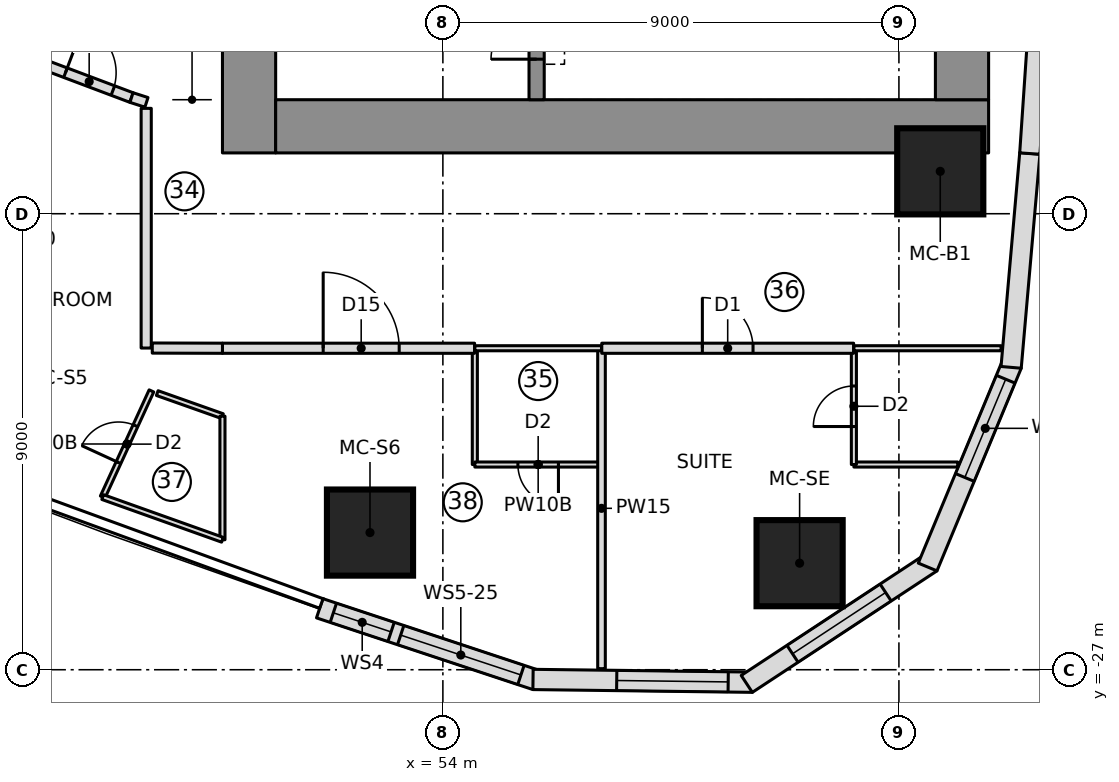
"""IFC4 building model, lengths in metres.
Left out: names, types, materials, properties, quantities, classifications, styles, units other than length and angle.
Written with IfcOpenShell. Run it as: python <this file> out.ifc"""

import sys

from ifc_helpers import new_model, si_unit, direction, frame, frame_2d, origin, origin_2d, place, context, subcontext, project, spatial, polyline, rectangle, outline, extrude, element, fill, save


model = new_model("IFC4")
c1 = context("Model", 3, precision=1e-05, world=origin(), true_north=direction((0.0, 1.0)))
c2 = subcontext(c1, "Body", "Model", "MODEL_VIEW")
j1 = project(units=[si_unit("LENGTHUNIT", "METRE"), si_unit("PLANEANGLEUNIT", "RADIAN")], contexts=[c1])
p1 = place(None, origin())
s1 = spatial("IfcSite", under=j1, at=p1, CompositionType="ELEMENT")
p2 = place(p1, origin())
s2 = spatial("IfcBuilding", under=s1, at=p2, CompositionType="ELEMENT")
p3 = place(p2, frame((0.0, 0.0, 116.85)))
s3 = spatial("IfcBuildingStorey", under=s2, at=p3, CompositionType="ELEMENT", Elevation=116.85)
p4 = place(p3, frame((50.175, -16.8, 0.0), z_axis=(0.0, 0.0, 1.0), x_axis=(0.0, 1.0, 0.0)))
e1 = element("IfcWall", 1, at=p4, inside=s3, PredefinedType="SHEAR", context=c2, shape_type="SweptSolid", body=[
    extrude(rectangle(XDim=10.15, YDim=1.05, at=frame_2d((5.075, 0.0))), origin(), (0.0, 0.0, 1.0), 3.55),
])
p5 = place(p4, frame((2.55, 0.0, 0.0)))
e2 = element("IfcOpeningElement", 2, at=p5, cuts=e1, PredefinedType="OPENING", context=c2, shape_type="SweptSolid", body=[
    extrude(rectangle(XDim=1.1, YDim=2.1, at=frame_2d((0.55, 1.05))), frame((0.0, 0.535, 0.0), z_axis=(0.0, -1.0, 0.0), x_axis=(1.0, 0.0, 0.0)), (0.0, 0.0, 1.0), 1.07),
])
p6 = place(p3, frame((50.7, -16.275, 0.0), z_axis=(0.0, 0.0, 1.0), x_axis=(1.0, 0.0, 0.0)))
e3 = element("IfcWall", 3, at=p6, inside=s3, PredefinedType="SHEAR", context=c2, shape_type="SweptSolid", body=[
    extrude(rectangle(XDim=14.07, YDim=1.05, at=frame_2d((7.035, 0.0))), origin(), (0.0, 0.0, 1.0), 3.55),
])
p7 = place(p3, frame((64.245, -15.75, 0.0), z_axis=(0.0, 0.0, 1.0), x_axis=(0.0, 1.0, 0.0)))
e4 = element("IfcWall", 4, at=p7, inside=s3, PredefinedType="SHEAR", context=c2, shape_type="SweptSolid", body=[
    extrude(rectangle(XDim=6.361, YDim=1.05, at=frame_2d((3.181, 0.0))), origin(), (0.0, 0.0, 1.0), 3.55),
])
p8 = place(p3, frame((55.85, -15.75, 0.0), z_axis=(0.0, 0.0, 1.0), x_axis=(0.0, 1.0, 0.0)))
e5 = element("IfcWall", 5, at=p8, inside=s3, PredefinedType="SHEAR", context=c2, shape_type="SweptSolid", body=[
    extrude(rectangle(XDim=5.4, YDim=0.3, at=frame_2d((2.7, 0.0))), origin(), (0.0, 0.0, 1.0), 3.55),
])
p9 = place(p8, frame((3.6, 0.0, 0.0)))
e6 = element("IfcOpeningElement", 6, at=p9, cuts=e5, PredefinedType="OPENING", context=c2, shape_type="SweptSolid", body=[
    extrude(rectangle(XDim=1.1, YDim=2.1, at=frame_2d((0.55, 1.05))), frame((0.0, 0.16, 0.0), z_axis=(0.0, -1.0, 0.0), x_axis=(1.0, 0.0, 0.0)), (0.0, 0.0, 1.0), 0.32),
])
p10 = place(p8, frame((0.8, 0.0, 0.0)))
e7 = element("IfcOpeningElement", 7, at=p10, cuts=e5, PredefinedType="OPENING", context=c2, shape_type="SweptSolid", body=[
    extrude(rectangle(XDim=0.9, YDim=2.1, at=frame_2d((0.45, 1.05))), frame((0.0, 0.16, 0.0), z_axis=(0.0, -1.0, 0.0), x_axis=(1.0, 0.0, 0.0)), (0.0, 0.0, 1.0), 0.32),
])
for number, where, z_axis, x_axis in (
    (8, (52.562, -24.293, 0.0), (0.0, 0.0, 1.0), (1.0, 0.0, 0.0)),
    (9, (61.04, -24.897, 0.0), (0.0, 0.0, 1.0), (1.0, 0.0, 0.0)),
    (10, (63.816, -17.164, 0.0), (0.0, 0.0, 1.0), (1.0, 0.0, 0.0)),
):
    element("IfcColumn", number, at=place(p3, frame(where, z_axis=z_axis, x_axis=x_axis)), inside=s3, PredefinedType="COLUMN", context=c2, shape_type="SweptSolid", body=[
        extrude(rectangle(XDim=1.7, YDim=1.7, at=origin_2d()), origin(), (0.0, 0.0, 1.0), 3.55),
    ])
p11 = place(p3, frame((51.569, -25.787, 0.0), z_axis=(0.0, 0.0, 1.0), x_axis=(0.94925004851, -0.314522408429, 0.0)))
e11 = element("IfcWall", 11, at=p11, inside=s3, PredefinedType="NOTDEFINED", context=c2, shape_type="SweptSolid", body=[
    extrude(outline(polyline([(0.0, -0.2), (4.499, -0.2), (4.437, 0.2), (0.0, 0.2), (0.0, -0.2)])), origin(), (0.0, 0.0, 1.0), 3.25),
])
p12 = place(p11, frame((0.284, 0.0, 0.9)))
e12 = element("IfcOpeningElement", 12, at=p12, cuts=e11, PredefinedType="OPENING", context=c2, shape_type="SweptSolid", body=[
    extrude(rectangle(XDim=1.2, YDim=1.8, at=frame_2d((0.6, 0.9))), frame((0.0, 0.21, 0.0), z_axis=(0.0, -1.0, 0.0), x_axis=(1.0, 0.0, 0.0)), (0.0, 0.0, 1.0), 0.42),
])
p13 = place(p11, frame((1.684, 0.0, 0.9)))
e13 = element("IfcOpeningElement", 13, at=p13, cuts=e11, PredefinedType="OPENING", context=c2, shape_type="SweptSolid", body=[
    extrude(rectangle(XDim=2.5, YDim=1.8, at=frame_2d((1.25, 0.9))), frame((0.0, 0.21, 0.0), z_axis=(0.0, -1.0, 0.0), x_axis=(1.0, 0.0, 0.0)), (0.0, 0.0, 1.0), 0.42),
])
p14 = place(p3, frame((55.81, -27.192, 0.0), z_axis=(0.0, 0.0, 1.0), x_axis=(0.999919718849, -0.012671063772, 0.0)))
e14 = element("IfcWall", 14, at=p14, inside=s3, PredefinedType="NOTDEFINED", context=c2, shape_type="SweptSolid", body=[
    extrude(outline(polyline([(-0.031, -0.2), (4.3, -0.2), (4.177, 0.2), (0.031, 0.2), (-0.031, -0.2)])), origin(), (0.0, 0.0, 1.0), 3.25),
])
p15 = place(p14, frame((1.621, 0.0, 0.6)))
e15 = element("IfcOpeningElement", 15, at=p15, cuts=e14, PredefinedType="OPENING", context=c2, shape_type="SweptSolid", body=[
    extrude(outline(polyline([(0.0, 1.35), (0.084, 1.771), (0.322, 2.128), (0.679, 2.366), (1.1, 2.45), (1.521, 2.366), (1.878, 2.128), (2.116, 1.771), (2.2, 1.35), (2.2, 1.1), (2.116, 0.679), (1.878, 0.322), (1.521, 0.084), (1.1, 0.0), (0.679, 0.084), (0.322, 0.322), (0.084, 0.679), (0.0, 1.1), (0.0, 1.35)])), frame((0.0, 0.21, 0.0), z_axis=(0.0, -1.0, 0.0), x_axis=(1.0, 0.0, 0.0)), (0.0, 0.0, 1.0), 0.42),
])
p16 = place(p3, frame((60.049, -27.246, 0.0), z_axis=(0.0, 0.0, 1.0), x_axis=(0.835340523653, 0.549732852887, 0.0)))
e16 = element("IfcWall", 16, at=p16, inside=s3, PredefinedType="NOTDEFINED", context=c2, shape_type="SweptSolid", body=[
    extrude(outline(polyline([(-0.061, -0.2), (4.3, -0.2), (4.178, 0.2), (0.061, 0.2), (-0.061, -0.2)])), origin(), (0.0, 0.0, 1.0), 3.25),
])
p17 = place(p16, frame((1.02, 0.0, 0.6)))
e17 = element("IfcOpeningElement", 17, at=p17, cuts=e16, PredefinedType="OPENING", context=c2, shape_type="SweptSolid", body=[
    extrude(outline(polyline([(0.0, 1.35), (0.084, 1.771), (0.322, 2.128), (0.679, 2.366), (1.1, 2.45), (1.521, 2.366), (1.878, 2.128), (2.116, 1.771), (2.2, 1.35), (2.2, 1.1), (2.116, 0.679), (1.878, 0.322), (1.521, 0.084), (1.1, 0.0), (0.679, 0.084), (0.322, 0.322), (0.084, 0.679), (0.0, 1.1), (0.0, 1.35)])), frame((0.0, 0.21, 0.0), z_axis=(0.0, -1.0, 0.0), x_axis=(1.0, 0.0, 0.0)), (0.0, 0.0, 1.0), 0.42),
])
p18 = place(p3, frame((63.59, -24.916, 0.0), z_axis=(0.0, 0.0, 1.0), x_axis=(0.383997751971, 0.923334027577, 0.0)))
e18 = element("IfcWall", 18, at=p18, inside=s3, PredefinedType="NOTDEFINED", context=c2, shape_type="SweptSolid", body=[
    extrude(outline(polyline([(-0.061, -0.2), (4.27, -0.2), (4.208, 0.2), (0.061, 0.2), (-0.061, -0.2)])), origin(), (0.0, 0.0, 1.0), 3.25),
])
p19 = place(p18, frame((1.852, 0.0, 0.6)))
e19 = element("IfcOpeningElement", 19, at=p19, cuts=e18, PredefinedType="OPENING", context=c2, shape_type="SweptSolid", body=[
    extrude(outline(polyline([(0.0, 1.4), (0.08, 1.802), (0.308, 2.142), (0.648, 2.37), (1.05, 2.45), (1.452, 2.37), (1.792, 2.142), (2.02, 1.802), (2.1, 1.4), (2.1, 1.05), (2.02, 0.648), (1.792, 0.308), (1.452, 0.08), (1.05, 0.0), (0.648, 0.08), (0.308, 0.308), (0.08, 0.648), (0.0, 1.05), (0.0, 1.4)])), frame((0.0, 0.21, 0.0), z_axis=(0.0, -1.0, 0.0), x_axis=(1.0, 0.0, 0.0)), (0.0, 0.0, 1.0), 0.42),
])
p20 = place(p3, frame((65.217, -21.002, 0.0), z_axis=(0.0, 0.0, 1.0), x_axis=(0.086992730434, 0.996208946382, 0.0)))
e20 = element("IfcWall", 20, at=p20, inside=s3, PredefinedType="NOTDEFINED", context=c2, shape_type="SweptSolid", body=[
    extrude(outline(polyline([(-0.031, -0.2), (4.209, -0.2), (4.205, 0.2), (0.031, 0.2), (-0.031, -0.2)])), origin(), (0.0, 0.0, 1.0), 3.25),
])
p21 = place(p3, frame((65.583, -16.811, 0.0), z_axis=(0.0, 0.0, 1.0), x_axis=(0.067724559895, 0.997704056315, 0.0)))
e21 = element("IfcWall", 21, at=p21, inside=s3, PredefinedType="NOTDEFINED", context=c2, shape_type="SweptSolid", body=[
    extrude(outline(polyline([(-0.002, -0.2), (4.209, -0.2), (4.205, 0.2), (0.002, 0.2), (-0.002, -0.2)])), origin(), (0.0, 0.0, 1.0), 3.25),
])
p22 = place(p3, frame((54.631, -22.95, 0.0), z_axis=(0.0, 0.0, 1.0), x_axis=(0.0, 1.0, 0.0)))
e22 = element("IfcWall", 22, at=p22, inside=s3, PredefinedType="PARTITIONING", context=c2, shape_type="SweptSolid", body=[
    extrude(rectangle(XDim=2.3, YDim=0.1, at=frame_2d((1.15, 0.0))), origin(), (0.0, 0.0, 1.0), 3.15),
])
p23 = place(p3, frame((57.131, -22.95, 0.0), z_axis=(0.0, 0.0, 1.0), x_axis=(-1.0, 0.0, 0.0)))
e23 = element("IfcWall", 23, at=p23, inside=s3, PredefinedType="PARTITIONING", context=c2, shape_type="SweptSolid", body=[
    extrude(rectangle(XDim=2.5, YDim=0.1, at=frame_2d((1.25, 0.0))), origin(), (0.0, 0.0, 1.0), 3.15),
])
p24 = place(p23, frame((0.85, 0.0, 0.0)))
e24 = element("IfcOpeningElement", 24, at=p24, cuts=e23, PredefinedType="OPENING", context=c2, shape_type="SweptSolid", body=[
    extrude(rectangle(XDim=0.8, YDim=2.1, at=frame_2d((0.4, 1.05))), frame((0.0, 0.06, 0.0), z_axis=(0.0, -1.0, 0.0), x_axis=(1.0, 0.0, 0.0)), (0.0, 0.0, 1.0), 0.12),
])
p25 = place(p3, frame((64.16, -22.95, 0.0), z_axis=(0.0, 0.0, 1.0), x_axis=(-1.0, 0.0, 0.0)))
e25 = element("IfcWall", 25, at=p25, inside=s3, PredefinedType="PARTITIONING", context=c2, shape_type="SweptSolid", body=[
    extrude(rectangle(XDim=2.049, YDim=0.1, at=frame_2d((1.025, 0.0))), origin(), (0.0, 0.0, 1.0), 3.15),
])
p26 = place(p3, frame((62.111, -22.95, 0.0), z_axis=(0.0, 0.0, 1.0), x_axis=(0.0, 1.0, 0.0)))
e26 = element("IfcWall", 26, at=p26, inside=s3, PredefinedType="PARTITIONING", context=c2, shape_type="SweptSolid", body=[
    extrude(rectangle(XDim=2.3, YDim=0.1, at=frame_2d((1.15, 0.0))), origin(), (0.0, 0.0, 1.0), 3.15),
])
p27 = place(p26, frame((0.75, 0.0, 0.0)))
e27 = element("IfcOpeningElement", 27, at=p27, cuts=e26, PredefinedType="OPENING", context=c2, shape_type="SweptSolid", body=[
    extrude(rectangle(XDim=0.8, YDim=2.1, at=frame_2d((0.4, 1.05))), frame((0.0, 0.06, 0.0), z_axis=(0.0, -1.0, 0.0), x_axis=(1.0, 0.0, 0.0)), (0.0, 0.0, 1.0), 0.12),
])
p28 = place(p3, frame((57.131, -26.979, 0.0), z_axis=(0.0, 0.0, 1.0), x_axis=(0.0, 1.0, 0.0)))
e28 = element("IfcWall", 28, at=p28, inside=s3, PredefinedType="PARTITIONING", context=c2, shape_type="SweptSolid", body=[
    extrude(rectangle(XDim=6.329, YDim=0.15, at=frame_2d((3.165, 0.0))), origin(), (0.0, 0.0, 1.0), 3.15),
])
p29 = place(p3, frame((48.363, -21.54, 0.0), z_axis=(0.0, 0.0, 1.0), x_axis=(0.942692856107, -0.333661773425, 0.0)))
e29 = element("IfcWall", 29, at=p29, inside=s3, PredefinedType="PARTITIONING", context=c2, shape_type="SweptSolid", body=[
    extrude(rectangle(XDim=1.365, YDim=0.1, at=frame_2d((0.683, 0.0))), origin(), (0.0, 0.0, 1.0), 3.15),
])
p30 = place(p3, frame((47.286, -23.592, 0.0), z_axis=(0.0, 0.0, 1.0), x_axis=(0.41749308293, 0.908680100864, 0.0)))
e30 = element("IfcWall", 30, at=p30, inside=s3, PredefinedType="PARTITIONING", context=c2, shape_type="SweptSolid", body=[
    extrude(rectangle(XDim=2.306, YDim=0.1, at=frame_2d((1.153, 0.0))), origin(), (0.0, 0.0, 1.0), 3.15),
])
p31 = place(p30, frame((0.75, 0.0, 0.0)))
e31 = element("IfcOpeningElement", 31, at=p31, cuts=e30, PredefinedType="OPENING", context=c2, shape_type="SweptSolid", body=[
    extrude(rectangle(XDim=0.8, YDim=2.1, at=frame_2d((0.4, 1.05))), frame((0.0, 0.06, 0.0), z_axis=(0.0, -1.0, 0.0), x_axis=(1.0, 0.0, 0.0)), (0.0, 0.0, 1.0), 0.12),
])
p32 = place(p3, frame((49.65, -20.655, 0.0), z_axis=(0.0, 0.0, 1.0), x_axis=(1.0, 0.0, 0.0)))
e32 = element("IfcWall", 32, at=p32, inside=s3, PredefinedType="PARTITIONING", context=c2, shape_type="SweptSolid", body=[
    extrude(rectangle(XDim=4.976, YDim=0.2, at=frame_2d((2.488, 0.0))), origin(), (0.0, 0.0, 1.0), 3.15),
])
p33 = place(p32, frame((1.988, 0.0, 0.0)))
e33 = element("IfcOpeningElement", 33, at=p33, cuts=e32, PredefinedType="OPENING", context=c2, shape_type="SweptSolid", body=[
    extrude(rectangle(XDim=1.5, YDim=2.1, at=frame_2d((0.75, 1.05))), frame((0.0, 0.11, 0.0), z_axis=(0.0, -1.0, 0.0), x_axis=(1.0, 0.0, 0.0)), (0.0, 0.0, 1.0), 0.22),
])
p34 = place(p3, frame((57.135, -20.655, 0.0), z_axis=(0.0, 0.0, 1.0), x_axis=(1.0, 0.0, 0.0)))
e34 = element("IfcWall", 34, at=p34, inside=s3, PredefinedType="PARTITIONING", context=c2, shape_type="SweptSolid", body=[
    extrude(rectangle(XDim=4.971, YDim=0.2, at=frame_2d((2.485, 0.0))), origin(), (0.0, 0.0, 1.0), 3.15),
])
p35 = place(p34, frame((1.985, 0.0, 0.0)))
e35 = element("IfcOpeningElement", 35, at=p35, cuts=e34, PredefinedType="OPENING", context=c2, shape_type="SweptSolid", body=[
    extrude(rectangle(XDim=1.0, YDim=2.1, at=frame_2d((0.5, 1.05))), frame((0.0, 0.11, 0.0), z_axis=(0.0, -1.0, 0.0), x_axis=(1.0, 0.0, 0.0)), (0.0, 0.0, 1.0), 0.22),
])
p36 = place(p3, frame((54.631, -20.655, 0.0), z_axis=(0.0, 0.0, 1.0), x_axis=(1.0, 0.0, 0.0)))
e36 = element("IfcWall", 36, at=p36, inside=s3, PredefinedType="PARTITIONING", context=c2, shape_type="SweptSolid", body=[
    extrude(rectangle(XDim=2.5, YDim=0.1, at=frame_2d((1.25, 0.0))), origin(), (0.0, 0.0, 1.0), 3.15),
])
p37 = place(p3, frame((62.111, -20.655, 0.0), z_axis=(0.0, 0.0, 1.0), x_axis=(1.0, 0.0, 0.0)))
e37 = element("IfcWall", 37, at=p37, inside=s3, PredefinedType="PARTITIONING", context=c2, shape_type="SweptSolid", body=[
    extrude(rectangle(XDim=2.906, YDim=0.1, at=frame_2d((1.453, 0.0))), origin(), (0.0, 0.0, 1.0), 3.15),
])
p38 = place(p3, frame((49.65, -21.996, 0.0), z_axis=(0.0, 0.0, 1.0), x_axis=(0.0, -1.0, 0.0)))
e38 = element("IfcWall", 38, at=p38, inside=s3, PredefinedType="PARTITIONING", context=c2, shape_type="SweptSolid", body=[
    extrude(rectangle(XDim=2.439, YDim=0.1, at=frame_2d((1.22, 0.0))), origin(), (0.0, 0.0, 1.0), 3.15),
])
p39 = place(p3, frame((49.65, -24.435, 0.0), z_axis=(0.0, 0.0, 1.0), x_axis=(-0.941933231826, 0.335800218555, 0.0)))
e39 = element("IfcWall", 39, at=p39, inside=s3, PredefinedType="PARTITIONING", context=c2, shape_type="SweptSolid", body=[
    extrude(rectangle(XDim=2.51, YDim=0.1, at=frame_2d((1.255, 0.0))), origin(), (0.0, 0.0, 1.0), 3.15),
])
p40 = place(p3, frame((46.185, -15.079, 0.0), z_axis=(0.0, 0.0, 1.0), x_axis=(0.935895556609, -0.352277599513, 0.0)))
e40 = element("IfcWall", 40, at=p40, inside=s3, PredefinedType="PARTITIONING", context=c2, shape_type="SweptSolid", body=[
    extrude(rectangle(XDim=1.785, YDim=0.2, at=frame_2d((0.892, 0.0))), origin(), (0.0, 0.0, 1.0), 3.15),
])
p41 = place(p40, frame((0.392, 0.0, 0.0)))
e41 = element("IfcOpeningElement", 41, at=p41, cuts=e40, PredefinedType="OPENING", context=c2, shape_type="SweptSolid", body=[
    extrude(rectangle(XDim=1.0, YDim=2.1, at=frame_2d((0.5, 1.05))), frame((0.0, 0.11, 0.0), z_axis=(0.0, -1.0, 0.0), x_axis=(1.0, 0.0, 0.0)), (0.0, 0.0, 1.0), 0.22),
])
p42 = place(p3, frame((47.855, -15.707, 0.0), z_axis=(0.0, 0.0, 1.0), x_axis=(0.952167766291, -0.305575759571, 0.0)))
e42 = element("IfcWall", 42, at=p42, inside=s3, PredefinedType="PARTITIONING", context=c2, shape_type="SweptSolid", body=[
    extrude(rectangle(XDim=0.31, YDim=0.2, at=frame_2d((0.155, 0.0))), origin(), (0.0, 0.0, 1.0), 3.15),
])
p43 = place(p3, frame((48.145, -15.92, 0.0), z_axis=(0.0, 0.0, 1.0), x_axis=(-5.1610239e-05, -0.999999998668, 0.0)))
e43 = element("IfcWall", 43, at=p43, inside=s3, PredefinedType="PARTITIONING", context=c2, shape_type="SweptSolid", body=[
    extrude(rectangle(XDim=4.73, YDim=0.2, at=frame_2d((2.365, 0.0))), origin(), (0.0, 0.0, 1.0), 3.15),
])
p44 = place(p3, frame((48.265, -20.651, 0.0), z_axis=(0.0, 0.0, 1.0), x_axis=(0.999996503144, -0.002644560569, 0.0)))
e44 = element("IfcWall", 44, at=p44, inside=s3, PredefinedType="PARTITIONING", context=c2, shape_type="SweptSolid", body=[
    extrude(rectangle(XDim=1.385, YDim=0.2, at=frame_2d((0.692, 0.0))), origin(), (0.0, 0.0, 1.0), 3.15),
])
p45 = place(p12, origin())
e45 = element("IfcWindow", 45, at=p45, inside=s3, PartitioningType="SINGLE_PANEL", PredefinedType="WINDOW", context=c2, shape_type="SweptSolid", body=[
    extrude(rectangle(XDim=1.2, YDim=1.8, at=frame_2d((0.6, 0.9))), frame((0.0, 0.17, 0.0), z_axis=(0.0, -1.0, 0.0), x_axis=(1.0, 0.0, 0.0)), (0.0, 0.0, 1.0), 0.06),
])
fill(e12, e45)
p46 = place(p13, origin())
e46 = element("IfcWindow", 46, at=p46, inside=s3, PartitioningType="SINGLE_PANEL", PredefinedType="WINDOW", context=c2, shape_type="SweptSolid", body=[
    extrude(rectangle(XDim=2.5, YDim=1.8, at=frame_2d((1.25, 0.9))), frame((0.0, 0.17, 0.0), z_axis=(0.0, -1.0, 0.0), x_axis=(1.0, 0.0, 0.0)), (0.0, 0.0, 1.0), 0.06),
])
fill(e13, e46)
p47 = place(p15, origin())
e47 = element("IfcWindow", 47, at=p47, inside=s3, PartitioningType="SINGLE_PANEL", PredefinedType="WINDOW", context=c2, shape_type="SweptSolid", body=[
    extrude(outline(polyline([(0.0, 1.35), (0.084, 1.771), (0.322, 2.128), (0.679, 2.366), (1.1, 2.45), (1.521, 2.366), (1.878, 2.128), (2.116, 1.771), (2.2, 1.35), (2.2, 1.1), (2.116, 0.679), (1.878, 0.322), (1.521, 0.084), (1.1, 0.0), (0.679, 0.084), (0.322, 0.322), (0.084, 0.679), (0.0, 1.1), (0.0, 1.35)])), frame((0.0, 0.17, 0.0), z_axis=(0.0, -1.0, 0.0), x_axis=(1.0, 0.0, 0.0)), (0.0, 0.0, 1.0), 0.06),
])
fill(e15, e47)
p48 = place(p17, origin())
e48 = element("IfcWindow", 48, at=p48, inside=s3, PartitioningType="SINGLE_PANEL", PredefinedType="WINDOW", context=c2, shape_type="SweptSolid", body=[
    extrude(outline(polyline([(0.0, 1.35), (0.084, 1.771), (0.322, 2.128), (0.679, 2.366), (1.1, 2.45), (1.521, 2.366), (1.878, 2.128), (2.116, 1.771), (2.2, 1.35), (2.2, 1.1), (2.116, 0.679), (1.878, 0.322), (1.521, 0.084), (1.1, 0.0), (0.679, 0.084), (0.322, 0.322), (0.084, 0.679), (0.0, 1.1), (0.0, 1.35)])), frame((0.0, 0.17, 0.0), z_axis=(0.0, -1.0, 0.0), x_axis=(1.0, 0.0, 0.0)), (0.0, 0.0, 1.0), 0.06),
])
fill(e17, e48)
p49 = place(p19, origin())
e49 = element("IfcWindow", 49, at=p49, inside=s3, PartitioningType="SINGLE_PANEL", PredefinedType="WINDOW", context=c2, shape_type="SweptSolid", body=[
    extrude(outline(polyline([(0.0, 1.4), (0.08, 1.802), (0.308, 2.142), (0.648, 2.37), (1.05, 2.45), (1.452, 2.37), (1.792, 2.142), (2.02, 1.802), (2.1, 1.4), (2.1, 1.05), (2.02, 0.648), (1.792, 0.308), (1.452, 0.08), (1.05, 0.0), (0.648, 0.08), (0.308, 0.308), (0.08, 0.648), (0.0, 1.05), (0.0, 1.4)])), frame((0.0, 0.17, 0.0), z_axis=(0.0, -1.0, 0.0), x_axis=(1.0, 0.0, 0.0)), (0.0, 0.0, 1.0), 0.06),
])
fill(e19, e49)
p50 = place(p24, origin())
e50 = element("IfcDoor", 50, at=p50, inside=s3, OperationType="SINGLE_SWING_LEFT", PredefinedType="DOOR", context=c2, shape_type="SweptSolid", body=[
    extrude(rectangle(XDim=0.8, YDim=2.1, at=frame_2d((0.4, 1.05))), frame((0.0, 0.025, 0.0), z_axis=(0.0, -1.0, 0.0), x_axis=(1.0, 0.0, 0.0)), (0.0, 0.0, 1.0), 0.05),
])
fill(e24, e50)
p51 = place(p27, origin())
e51 = element("IfcDoor", 51, at=p51, inside=s3, OperationType="SINGLE_SWING_LEFT", PredefinedType="DOOR", context=c2, shape_type="SweptSolid", body=[
    extrude(rectangle(XDim=0.8, YDim=2.1, at=frame_2d((0.4, 1.05))), frame((0.0, 0.025, 0.0), z_axis=(0.0, -1.0, 0.0), x_axis=(1.0, 0.0, 0.0)), (0.0, 0.0, 1.0), 0.05),
])
fill(e27, e51)
p52 = place(p31, origin())
e52 = element("IfcDoor", 52, at=p52, inside=s3, OperationType="SINGLE_SWING_LEFT", PredefinedType="DOOR", context=c2, shape_type="SweptSolid", body=[
    extrude(rectangle(XDim=0.8, YDim=2.1, at=frame_2d((0.4, 1.05))), frame((0.0, 0.025, 0.0), z_axis=(0.0, -1.0, 0.0), x_axis=(1.0, 0.0, 0.0)), (0.0, 0.0, 1.0), 0.05),
])
fill(e31, e52)
p53 = place(p41, origin())
e53 = element("IfcDoor", 53, at=p53, inside=s3, OperationType="SINGLE_SWING_LEFT", PredefinedType="DOOR", context=c2, shape_type="SweptSolid", body=[
    extrude(rectangle(XDim=1.0, YDim=2.1, at=frame_2d((0.5, 1.05))), frame((0.0, 0.025, 0.0), z_axis=(0.0, -1.0, 0.0), x_axis=(1.0, 0.0, 0.0)), (0.0, 0.0, 1.0), 0.05),
])
fill(e41, e53)
p54 = place(p33, origin())
e54 = element("IfcDoor", 54, at=p54, inside=s3, OperationType="DOUBLE_DOOR_SINGLE_SWING", PredefinedType="DOOR", context=c2, shape_type="SweptSolid", body=[
    extrude(rectangle(XDim=1.5, YDim=2.1, at=frame_2d((0.75, 1.05))), frame((0.0, 0.025, 0.0), z_axis=(0.0, -1.0, 0.0), x_axis=(1.0, 0.0, 0.0)), (0.0, 0.0, 1.0), 0.05),
])
fill(e33, e54)
p55 = place(p35, origin())
e55 = element("IfcDoor", 55, at=p55, inside=s3, OperationType="SINGLE_SWING_LEFT", PredefinedType="DOOR", context=c2, shape_type="SweptSolid", body=[
    extrude(rectangle(XDim=1.0, YDim=2.1, at=frame_2d((0.5, 1.05))), frame((0.0, 0.025, 0.0), z_axis=(0.0, -1.0, 0.0), x_axis=(1.0, 0.0, 0.0)), (0.0, 0.0, 1.0), 0.05),
])
fill(e35, e55)
p56 = place(p10, origin())
e56 = element("IfcDoor", 56, at=p56, inside=s3, OperationType="SINGLE_SWING_LEFT", PredefinedType="DOOR", context=c2, shape_type="SweptSolid", body=[
    extrude(rectangle(XDim=0.9, YDim=2.1, at=frame_2d((0.45, 1.05))), frame((0.0, 0.025, 0.0), z_axis=(0.0, -1.0, 0.0), x_axis=(1.0, 0.0, 0.0)), (0.0, 0.0, 1.0), 0.05),
])
fill(e7, e56)
save(model, sys.argv[1])
